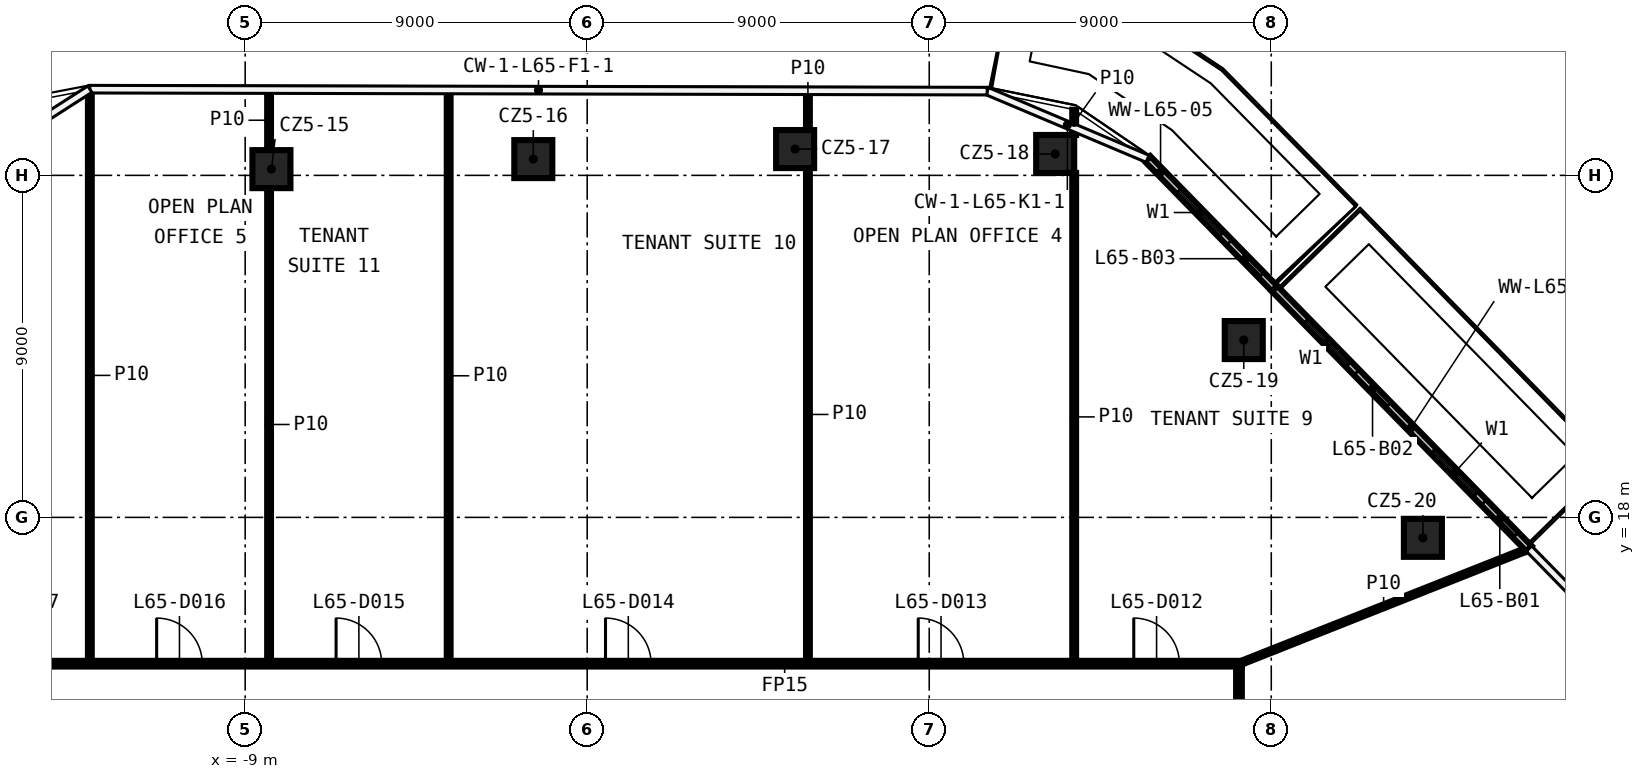
"""IFC4 building model, lengths in metres.
Left out: names, types, materials, properties, quantities, classifications, styles, units other than length and angle.
Written with IfcOpenShell. Run it as: python <this file> out.ifc"""

import sys

from ifc_helpers import new_model, si_unit, direction, frame, frame_2d, origin, origin_2d, place, context, subcontext, project, spatial, rectangle, extrude, element, fill, save


model = new_model("IFC4")
c1 = context("Model", 3, precision=1e-05, world=origin(), true_north=direction((0.0, 1.0)))
c2 = subcontext(c1, "Body", "Model", "MODEL_VIEW")
j1 = project(units=[si_unit("LENGTHUNIT", "METRE"), si_unit("PLANEANGLEUNIT", "RADIAN")], contexts=[c1])
p1 = place(None, origin())
s1 = spatial("IfcSite", under=j1, at=p1, CompositionType="ELEMENT")
p2 = place(p1, origin())
s2 = spatial("IfcBuilding", under=s1, at=p2, CompositionType="ELEMENT")
p3 = place(p2, frame((0.0, 0.0, 306.8)))
s3 = spatial("IfcBuildingStorey", under=s2, at=p3, CompositionType="ELEMENT", Elevation=306.8)
for number, where, z_axis, x_axis in (
    (1, (-8.309, 27.164, 0.0), (0.0, 0.0, 1.0), (1.0, 0.0, 0.0)),
    (2, (-1.418, 27.428, 0.0), (0.0, 0.0, 1.0), (1.0, 0.0, 0.0)),
    (3, (5.471, 27.692, 0.0), (0.0, 0.0, 1.0), (1.0, 0.0, 0.0)),
    (4, (12.314, 27.563, 0.0), (0.0, 0.0, 1.0), (1.0, 0.0, 0.0)),
    (5, (17.276, 22.666, 0.0), (0.0, 0.0, 1.0), (1.0, 0.0, 0.0)),
    (6, (21.99, 17.462, 0.0), (0.0, 0.0, 1.0), (1.0, 0.0, 0.0)),
):
    element("IfcColumn", number, at=place(p3, frame(where, z_axis=z_axis, x_axis=x_axis)), inside=s3, PredefinedType="COLUMN", context=c2, shape_type="SweptSolid", body=[
        extrude(rectangle(XDim=1.0, YDim=1.0, at=origin_2d()), origin(), (0.0, 0.0, 1.0), 3.82),
    ])
p4 = place(p3, frame((-17.225, 14.15, 0.0), z_axis=(0.0, 0.0, 1.0), x_axis=(1.0, 0.0, 0.0)))
e7 = element("IfcWall", 7, at=p4, inside=s3, PredefinedType="PARTITIONING", context=c2, shape_type="SweptSolid", body=[
    extrude(rectangle(XDim=34.45, YDim=0.15, at=frame_2d((17.225, 0.0))), origin(), (0.0, 0.0, 1.0), 3.82),
])
p5 = place(p4, frame((31.607, 0.0, 0.0)))
e8 = element("IfcOpeningElement", 8, at=p5, cuts=e7, PredefinedType="OPENING", context=c2, shape_type="SweptSolid", body=[
    extrude(rectangle(XDim=1.2, YDim=2.1, at=frame_2d((0.6, 1.05))), frame((0.0, 0.085, 0.0), z_axis=(0.0, -1.0, 0.0), x_axis=(1.0, 0.0, 0.0)), (0.0, 0.0, 1.0), 0.17),
])
p6 = place(p4, frame((25.936, 0.0, 0.0)))
e9 = element("IfcOpeningElement", 9, at=p6, cuts=e7, PredefinedType="OPENING", context=c2, shape_type="SweptSolid", body=[
    extrude(rectangle(XDim=1.2, YDim=2.1, at=frame_2d((0.6, 1.05))), frame((0.0, 0.085, 0.0), z_axis=(0.0, -1.0, 0.0), x_axis=(1.0, 0.0, 0.0)), (0.0, 0.0, 1.0), 0.17),
])
p7 = place(p4, frame((17.707, 0.0, 0.0)))
e10 = element("IfcOpeningElement", 10, at=p7, cuts=e7, PredefinedType="OPENING", context=c2, shape_type="SweptSolid", body=[
    extrude(rectangle(XDim=1.2, YDim=2.1, at=frame_2d((0.6, 1.05))), frame((0.0, 0.085, 0.0), z_axis=(0.0, -1.0, 0.0), x_axis=(1.0, 0.0, 0.0)), (0.0, 0.0, 1.0), 0.17),
])
p8 = place(p4, frame((10.617, 0.0, 0.0)))
e11 = element("IfcOpeningElement", 11, at=p8, cuts=e7, PredefinedType="OPENING", context=c2, shape_type="SweptSolid", body=[
    extrude(rectangle(XDim=1.2, YDim=2.1, at=frame_2d((0.6, 1.05))), frame((0.0, 0.085, 0.0), z_axis=(0.0, -1.0, 0.0), x_axis=(1.0, 0.0, 0.0)), (0.0, 0.0, 1.0), 0.17),
])
p9 = place(p4, frame((5.896, 0.0, 0.0)))
e12 = element("IfcOpeningElement", 12, at=p9, cuts=e7, PredefinedType="OPENING", context=c2, shape_type="SweptSolid", body=[
    extrude(rectangle(XDim=1.2, YDim=2.1, at=frame_2d((0.6, 1.05))), frame((0.0, 0.085, 0.0), z_axis=(0.0, -1.0, 0.0), x_axis=(1.0, 0.0, 0.0)), (0.0, 0.0, 1.0), 0.17),
])
p10 = place(p4, frame((1.506, 0.0, 0.0)))
e13 = element("IfcOpeningElement", 13, at=p10, cuts=e7, PredefinedType="OPENING", context=c2, shape_type="SweptSolid", body=[
    extrude(rectangle(XDim=1.2, YDim=2.1, at=frame_2d((0.6, 1.05))), frame((0.0, 0.085, 0.0), z_axis=(0.0, -1.0, 0.0), x_axis=(1.0, 0.0, 0.0)), (0.0, 0.0, 1.0), 0.17),
])
p11 = place(p3, frame((17.15, 14.15, 0.0), z_axis=(0.0, 0.0, 1.0), x_axis=(0.92958283513, 0.368613283308, 0.0)))
e14 = element("IfcWall", 14, at=p11, inside=s3, PredefinedType="PARTITIONING", context=c2, shape_type="SweptSolid", body=[
    extrude(rectangle(XDim=8.189, YDim=0.1, at=frame_2d((4.094, 0.0))), origin(), (0.0, 0.0, 1.0), 3.82),
])
p12 = place(p3, frame((17.15, 14.075, 0.0), z_axis=(0.0, 0.0, 1.0), x_axis=(0.0, -1.0, 0.0)))
e15 = element("IfcWall", 15, at=p12, inside=s3, PredefinedType="PARTITIONING", context=c2, shape_type="SweptSolid", body=[
    extrude(rectangle(XDim=28.15, YDim=0.15, at=frame_2d((14.075, 0.0))), origin(), (0.0, 0.0, 1.0), 3.82),
])
p13 = place(p12, frame((18.182, 0.0, 0.0)))
e16 = element("IfcOpeningElement", 16, at=p13, cuts=e15, PredefinedType="OPENING", context=c2, shape_type="SweptSolid", body=[
    extrude(rectangle(XDim=1.2, YDim=2.1, at=frame_2d((0.6, 1.05))), frame((0.0, 0.085, 0.0), z_axis=(0.0, -1.0, 0.0), x_axis=(1.0, 0.0, 0.0)), (0.0, 0.0, 1.0), 0.17),
])
p14 = place(p12, frame((10.811, 0.0, 0.0)))
e17 = element("IfcOpeningElement", 17, at=p14, cuts=e15, PredefinedType="OPENING", context=c2, shape_type="SweptSolid", body=[
    extrude(rectangle(XDim=1.2, YDim=2.1, at=frame_2d((0.6, 1.05))), frame((0.0, 0.085, 0.0), z_axis=(0.0, -1.0, 0.0), x_axis=(1.0, 0.0, 0.0)), (0.0, 0.0, 1.0), 0.17),
])
p15 = place(p12, frame((3.647, 0.0, 0.0)))
e18 = element("IfcOpeningElement", 18, at=p15, cuts=e15, PredefinedType="OPENING", context=c2, shape_type="SweptSolid", body=[
    extrude(rectangle(XDim=1.2, YDim=2.1, at=frame_2d((0.6, 1.05))), frame((0.0, 0.085, 0.0), z_axis=(0.0, -1.0, 0.0), x_axis=(1.0, 0.0, 0.0)), (0.0, 0.0, 1.0), 0.17),
])
p16 = place(p3, frame((12.814, 14.225, 0.0), z_axis=(0.0, 0.0, 1.0), x_axis=(0.0, 1.0, 0.0)))
e19 = element("IfcWall", 19, at=p16, inside=s3, PredefinedType="PARTITIONING", context=c2, shape_type="SweptSolid", body=[
    extrude(rectangle(XDim=12.838, YDim=0.1, at=frame_2d((6.419, 0.0))), origin(), (0.0, 0.0, 1.0), 3.82),
])
p17 = place(p3, frame((12.814, 28.063, 0.0), z_axis=(0.0, 0.0, 1.0), x_axis=(0.0, 1.0, 0.0)))
e20 = element("IfcWall", 20, at=p17, inside=s3, PredefinedType="PARTITIONING", context=c2, shape_type="SweptSolid", body=[
    extrude(rectangle(XDim=0.664, YDim=0.1, at=frame_2d((0.332, 0.0))), origin(), (0.0, 0.0, 1.0), 3.82),
])
p18 = place(p3, frame((5.808, 14.225, 0.0), z_axis=(0.0, 0.0, 1.0), x_axis=(0.0, 1.0, 0.0)))
e21 = element("IfcWall", 21, at=p18, inside=s3, PredefinedType="PARTITIONING", context=c2, shape_type="SweptSolid", body=[
    extrude(rectangle(XDim=12.967, YDim=0.1, at=frame_2d((6.483, 0.0))), origin(), (0.0, 0.0, 1.0), 3.82),
])
p19 = place(p3, frame((5.808, 28.192, 0.0), z_axis=(0.0, 0.0, 1.0), x_axis=(0.0, 1.0, 0.0)))
e22 = element("IfcWall", 22, at=p19, inside=s3, PredefinedType="PARTITIONING", context=c2, shape_type="SweptSolid", body=[
    extrude(rectangle(XDim=1.015, YDim=0.1, at=frame_2d((0.507, 0.0))), origin(), (0.0, 0.0, 1.0), 3.82),
])
p20 = place(p3, frame((-3.645, 14.225, 0.0), z_axis=(0.0, 0.0, 1.0), x_axis=(0.0, 1.0, 0.0)))
e23 = element("IfcWall", 23, at=p20, inside=s3, PredefinedType="PARTITIONING", context=c2, shape_type="SweptSolid", body=[
    extrude(rectangle(XDim=15.002, YDim=0.1, at=frame_2d((7.501, 0.0))), origin(), (0.0, 0.0, 1.0), 3.82),
])
p21 = place(p3, frame((-8.371, 14.225, 0.0), z_axis=(0.0, 0.0, 1.0), x_axis=(0.0, 1.0, 0.0)))
e24 = element("IfcWall", 24, at=p21, inside=s3, PredefinedType="PARTITIONING", context=c2, shape_type="SweptSolid", body=[
    extrude(rectangle(XDim=12.439, YDim=0.1, at=frame_2d((6.219, 0.0))), origin(), (0.0, 0.0, 1.0), 3.82),
])
p22 = place(p3, frame((-8.371, 27.664, 0.0), z_axis=(0.0, 0.0, 1.0), x_axis=(0.0, 1.0, 0.0)))
e25 = element("IfcWall", 25, at=p22, inside=s3, PredefinedType="PARTITIONING", context=c2, shape_type="SweptSolid", body=[
    extrude(rectangle(XDim=1.574, YDim=0.1, at=frame_2d((0.787, 0.0))), origin(), (0.0, 0.0, 1.0), 3.82),
])
p23 = place(p3, frame((-13.087, 14.225, 0.0), z_axis=(0.0, 0.0, 1.0), x_axis=(0.0, 1.0, 0.0)))
e26 = element("IfcWall", 26, at=p23, inside=s3, PredefinedType="PARTITIONING", context=c2, shape_type="SweptSolid", body=[
    extrude(rectangle(XDim=15.023, YDim=0.1, at=frame_2d((7.511, 0.0))), origin(), (0.0, 0.0, 1.0), 3.82),
])
p24 = place(p3, frame((24.782, 17.177, 0.0), z_axis=(0.0, 0.0, 1.0), x_axis=(-0.699351369698, 0.714778050657, 0.0)))
e27 = element("IfcWall", 27, at=p24, inside=s3, PredefinedType="SOLIDWALL", context=c2, shape_type="SweptSolid", body=[
    extrude(rectangle(XDim=9.575, YDim=0.2, at=frame_2d((4.787, 0.0))), origin(), (0.0, 0.0, 1.0), 3.82),
])
p25 = place(p24, frame((2.0, 0.0, 0.6)))
e28 = element("IfcOpeningElement", 28, at=p25, cuts=e27, PredefinedType="OPENING", context=c2, shape_type="SweptSolid", body=[
    extrude(rectangle(XDim=1.6, YDim=2.4, at=frame_2d((0.8, 1.2))), frame((0.0, 0.11, 0.0), z_axis=(0.0, -1.0, 0.0), x_axis=(1.0, 0.0, 0.0)), (0.0, 0.0, 1.0), 0.22),
])
p26 = place(p24, frame((0.5, 0.0, 0.0)))
e29 = element("IfcOpeningElement", 29, at=p26, cuts=e27, PredefinedType="OPENING", context=c2, shape_type="SweptSolid", body=[
    extrude(rectangle(XDim=1.2, YDim=2.4, at=frame_2d((0.6, 1.2))), frame((0.0, 0.11, 0.0), z_axis=(0.0, -1.0, 0.0), x_axis=(1.0, 0.0, 0.0)), (0.0, 0.0, 1.0), 0.22),
])
p27 = place(p24, frame((6.787, 0.0, 0.6)))
e30 = element("IfcOpeningElement", 30, at=p27, cuts=e27, PredefinedType="OPENING", context=c2, shape_type="SweptSolid", body=[
    extrude(rectangle(XDim=1.6, YDim=2.4, at=frame_2d((0.8, 1.2))), frame((0.0, 0.11, 0.0), z_axis=(0.0, -1.0, 0.0), x_axis=(1.0, 0.0, 0.0)), (0.0, 0.0, 1.0), 0.22),
])
p28 = place(p24, frame((5.287, 0.0, 0.0)))
e31 = element("IfcOpeningElement", 31, at=p28, cuts=e27, PredefinedType="OPENING", context=c2, shape_type="SweptSolid", body=[
    extrude(rectangle(XDim=1.2, YDim=2.4, at=frame_2d((0.6, 1.2))), frame((0.0, 0.11, 0.0), z_axis=(0.0, -1.0, 0.0), x_axis=(1.0, 0.0, 0.0)), (0.0, 0.0, 1.0), 0.22),
])
p29 = place(p3, frame((18.086, 24.021, 0.0), z_axis=(0.0, 0.0, 1.0), x_axis=(-0.699373628804, 0.714756271279, 0.0)))
e32 = element("IfcWall", 32, at=p29, inside=s3, PredefinedType="SOLIDWALL", context=c2, shape_type="SweptSolid", body=[
    extrude(rectangle(XDim=4.777, YDim=0.2, at=frame_2d((2.389, 0.0))), origin(), (0.0, 0.0, 1.0), 3.82),
])
p30 = place(p29, frame((2.0, 0.0, 0.6)))
e33 = element("IfcOpeningElement", 33, at=p30, cuts=e32, PredefinedType="OPENING", context=c2, shape_type="SweptSolid", body=[
    extrude(rectangle(XDim=1.6, YDim=2.4, at=frame_2d((0.8, 1.2))), frame((0.0, 0.11, 0.0), z_axis=(0.0, -1.0, 0.0), x_axis=(1.0, 0.0, 0.0)), (0.0, 0.0, 1.0), 0.22),
])
p31 = place(p29, frame((0.5, 0.0, 0.0)))
e34 = element("IfcOpeningElement", 34, at=p31, cuts=e32, PredefinedType="OPENING", context=c2, shape_type="SweptSolid", body=[
    extrude(rectangle(XDim=1.2, YDim=2.4, at=frame_2d((0.6, 1.2))), frame((0.0, 0.11, 0.0), z_axis=(0.0, -1.0, 0.0), x_axis=(1.0, 0.0, 0.0)), (0.0, 0.0, 1.0), 0.22),
])
p32 = place(p5, origin())
e35 = element("IfcDoor", 35, at=p32, inside=s3, OperationType="SINGLE_SWING_LEFT", PredefinedType="DOOR", context=c2, shape_type="SweptSolid", body=[
    extrude(rectangle(XDim=1.2, YDim=2.1, at=frame_2d((0.6, 1.05))), frame((0.0, 0.025, 0.0), z_axis=(0.0, -1.0, 0.0), x_axis=(1.0, 0.0, 0.0)), (0.0, 0.0, 1.0), 0.05),
])
fill(e8, e35)
p33 = place(p6, origin())
e36 = element("IfcDoor", 36, at=p33, inside=s3, OperationType="SINGLE_SWING_RIGHT", PredefinedType="DOOR", context=c2, shape_type="SweptSolid", body=[
    extrude(rectangle(XDim=1.2, YDim=2.1, at=frame_2d((0.6, 1.05))), frame((0.0, 0.025, 0.0), z_axis=(0.0, -1.0, 0.0), x_axis=(1.0, 0.0, 0.0)), (0.0, 0.0, 1.0), 0.05),
])
fill(e9, e36)
p34 = place(p7, origin())
e37 = element("IfcDoor", 37, at=p34, inside=s3, OperationType="SINGLE_SWING_LEFT", PredefinedType="DOOR", context=c2, shape_type="SweptSolid", body=[
    extrude(rectangle(XDim=1.2, YDim=2.1, at=frame_2d((0.6, 1.05))), frame((0.0, 0.025, 0.0), z_axis=(0.0, -1.0, 0.0), x_axis=(1.0, 0.0, 0.0)), (0.0, 0.0, 1.0), 0.05),
])
fill(e10, e37)
p35 = place(p8, origin())
e38 = element("IfcDoor", 38, at=p35, inside=s3, OperationType="SINGLE_SWING_RIGHT", PredefinedType="DOOR", context=c2, shape_type="SweptSolid", body=[
    extrude(rectangle(XDim=1.2, YDim=2.1, at=frame_2d((0.6, 1.05))), frame((0.0, 0.025, 0.0), z_axis=(0.0, -1.0, 0.0), x_axis=(1.0, 0.0, 0.0)), (0.0, 0.0, 1.0), 0.05),
])
fill(e11, e38)
p36 = place(p9, origin())
e39 = element("IfcDoor", 39, at=p36, inside=s3, OperationType="SINGLE_SWING_LEFT", PredefinedType="DOOR", context=c2, shape_type="SweptSolid", body=[
    extrude(rectangle(XDim=1.2, YDim=2.1, at=frame_2d((0.6, 1.05))), frame((0.0, 0.025, 0.0), z_axis=(0.0, -1.0, 0.0), x_axis=(1.0, 0.0, 0.0)), (0.0, 0.0, 1.0), 0.05),
])
fill(e12, e39)
p37 = place(p25, origin())
e40 = element("IfcWindow", 40, at=p37, inside=s3, PartitioningType="SINGLE_PANEL", PredefinedType="WINDOW", context=c2, shape_type="SweptSolid", body=[
    extrude(rectangle(XDim=1.6, YDim=2.4, at=frame_2d((0.8, 1.2))), frame((0.0, 0.03, 0.0), z_axis=(0.0, -1.0, 0.0), x_axis=(1.0, 0.0, 0.0)), (0.0, 0.0, 1.0), 0.06),
])
fill(e28, e40)
p38 = place(p26, origin())
e41 = element("IfcDoor", 41, at=p38, inside=s3, OperationType="SLIDING_TO_LEFT", PredefinedType="DOOR", context=c2, shape_type="SweptSolid", body=[
    extrude(rectangle(XDim=1.2, YDim=2.4, at=frame_2d((0.6, 1.2))), frame((0.0, 0.025, 0.0), z_axis=(0.0, -1.0, 0.0), x_axis=(1.0, 0.0, 0.0)), (0.0, 0.0, 1.0), 0.05),
])
fill(e29, e41)
p39 = place(p27, origin())
e42 = element("IfcWindow", 42, at=p39, inside=s3, PartitioningType="SINGLE_PANEL", PredefinedType="WINDOW", context=c2, shape_type="SweptSolid", body=[
    extrude(rectangle(XDim=1.6, YDim=2.4, at=frame_2d((0.8, 1.2))), frame((0.0, 0.03, 0.0), z_axis=(0.0, -1.0, 0.0), x_axis=(1.0, 0.0, 0.0)), (0.0, 0.0, 1.0), 0.06),
])
fill(e30, e42)
p40 = place(p28, origin())
e43 = element("IfcDoor", 43, at=p40, inside=s3, OperationType="SLIDING_TO_LEFT", PredefinedType="DOOR", context=c2, shape_type="SweptSolid", body=[
    extrude(rectangle(XDim=1.2, YDim=2.4, at=frame_2d((0.6, 1.2))), frame((0.0, 0.025, 0.0), z_axis=(0.0, -1.0, 0.0), x_axis=(1.0, 0.0, 0.0)), (0.0, 0.0, 1.0), 0.05),
])
fill(e31, e43)
p41 = place(p30, origin())
e44 = element("IfcWindow", 44, at=p41, inside=s3, PartitioningType="SINGLE_PANEL", PredefinedType="WINDOW", context=c2, shape_type="SweptSolid", body=[
    extrude(rectangle(XDim=1.6, YDim=2.4, at=frame_2d((0.8, 1.2))), frame((0.0, 0.03, 0.0), z_axis=(0.0, -1.0, 0.0), x_axis=(1.0, 0.0, 0.0)), (0.0, 0.0, 1.0), 0.06),
])
fill(e33, e44)
p42 = place(p31, origin())
e45 = element("IfcDoor", 45, at=p42, inside=s3, OperationType="SLIDING_TO_LEFT", PredefinedType="DOOR", context=c2, shape_type="SweptSolid", body=[
    extrude(rectangle(XDim=1.2, YDim=2.4, at=frame_2d((0.6, 1.2))), frame((0.0, 0.025, 0.0), z_axis=(0.0, -1.0, 0.0), x_axis=(1.0, 0.0, 0.0)), (0.0, 0.0, 1.0), 0.05),
])
fill(e34, e45)
save(model, sys.argv[1])
